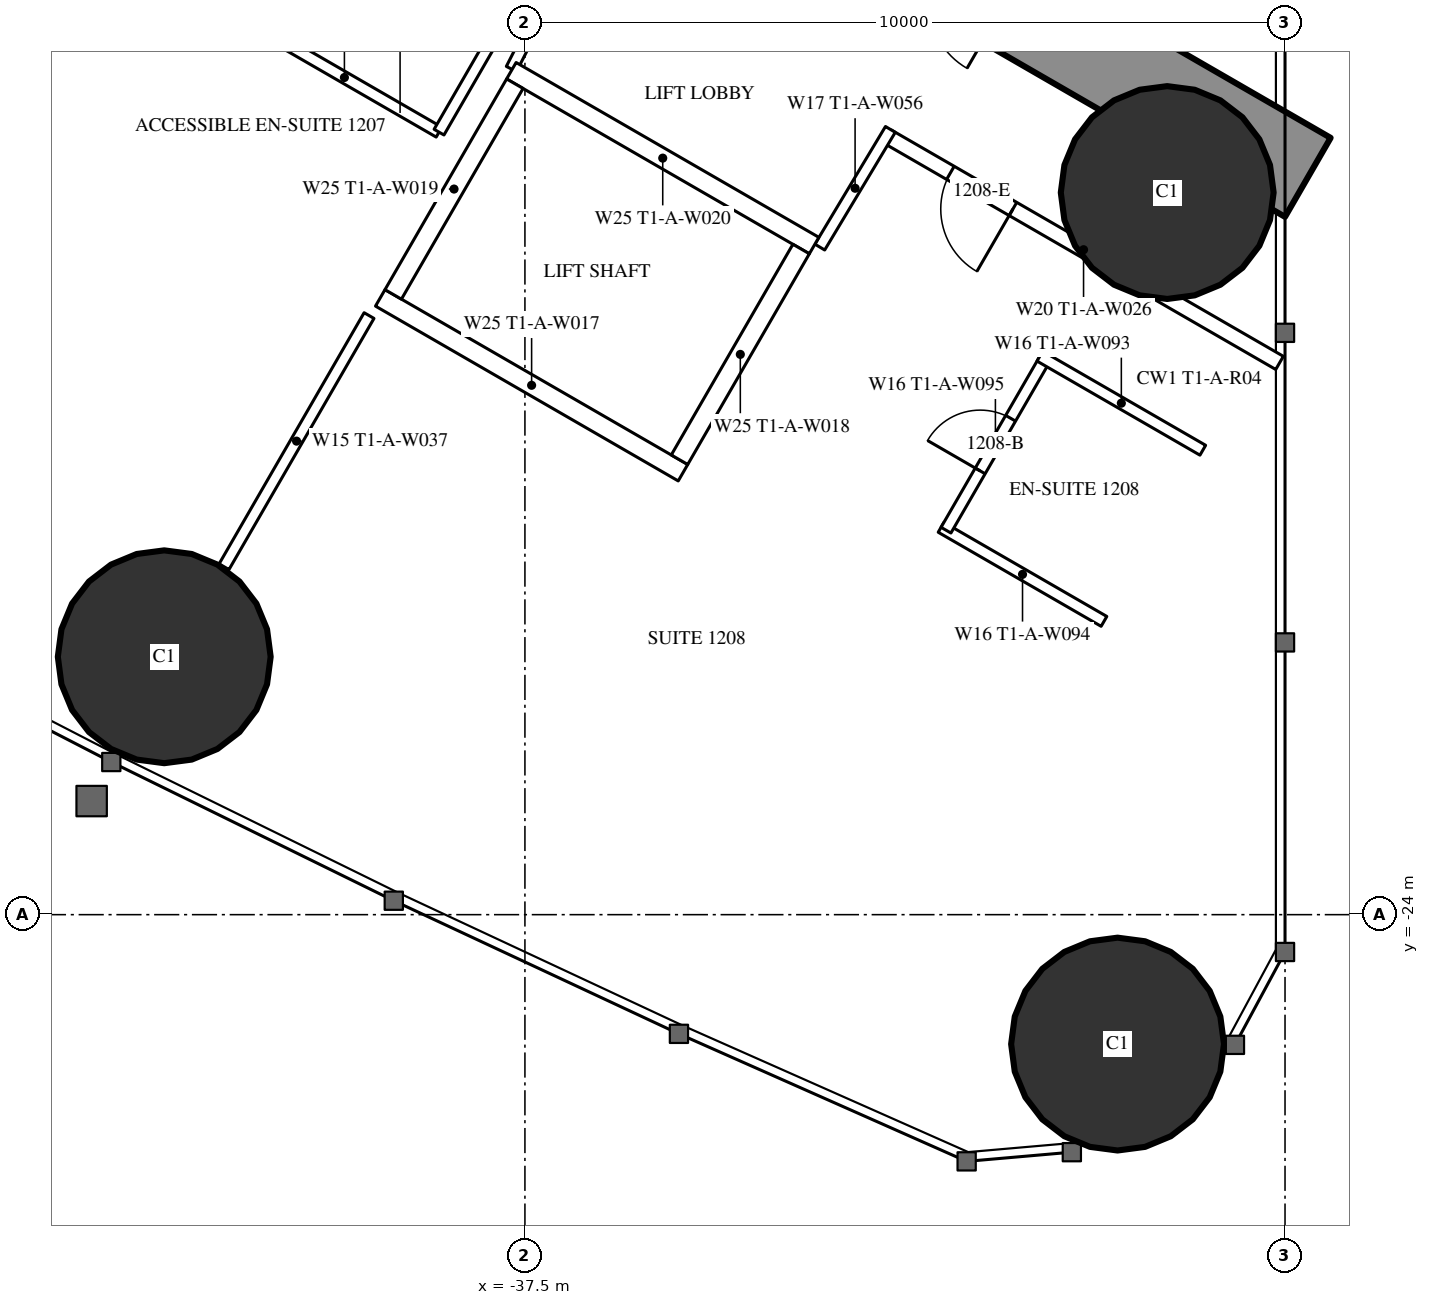
"""IFC4 building model, lengths in metres.
Left out: names, types, materials, properties, quantities, classifications, styles, units other than length and angle.
Written with IfcOpenShell. Run it as: python <this file> out.ifc"""

import sys

from ifc_helpers import new_model, si_unit, direction, frame, frame_2d, origin, origin_2d, place, context, subcontext, project, spatial, rectangle, hollow_circle, extrude, element, fill, save


model = new_model("IFC4")
c1 = context("Model", 3, precision=1e-05, world=origin(), true_north=direction((0.0, 1.0)))
c2 = subcontext(c1, "Body", "Model", "MODEL_VIEW")
j1 = project(units=[si_unit("LENGTHUNIT", "METRE"), si_unit("PLANEANGLEUNIT", "RADIAN")], contexts=[c1])
p1 = place(None, origin())
s1 = spatial("IfcSite", under=j1, at=p1, CompositionType="ELEMENT")
p2 = place(p1, origin())
s2 = spatial("IfcBuilding", under=s1, at=p2, CompositionType="ELEMENT")
p3 = place(p2, frame((0.0, 0.0, 49.5)))
s3 = spatial("IfcBuildingStorey", under=s2, at=p3, CompositionType="ELEMENT", Elevation=49.5)
for number, where, z_axis, x_axis in (
    (1, (-29.703, -25.703, 0.0), (0.0, 0.0, 1.0), (1.0, 0.0, 0.0)),
    (2, (-29.05, -14.5, 0.0), (0.0, 0.0, 1.0), (1.0, 0.0, 0.0)),
    (3, (-42.245, -20.607, 0.0), (0.0, 0.0, 1.0), (1.0, 0.0, 0.0)),
):
    element("IfcColumn", number, at=place(p3, frame(where, z_axis=z_axis, x_axis=x_axis)), inside=s3, PredefinedType="COLUMN", context=c2, shape_type="SweptSolid", body=[
        extrude(hollow_circle(Radius=1.4, WallThickness=0.12, at=origin_2d()), origin(), (0.0, 0.0, 1.0), 3.5),
    ])
p4 = place(p3, frame((-27.2, -14.3, 0.0), z_axis=(0.0, 0.0, 1.0), x_axis=(-0.866024021859, 0.500002393557, 0.0)))
e4 = element("IfcWall", 4, at=p4, inside=s3, PredefinedType="SHEAR", context=c2, shape_type="SweptSolid", body=[
    extrude(rectangle(XDim=27.907, YDim=1.2, at=frame_2d((13.954, 0.0))), origin(), (0.0, 0.0, 1.0), 3.5),
])
p5 = place(p4, frame((4.6, 0.0, 0.0)))
e5 = element("IfcOpeningElement", 5, at=p5, cuts=e4, PredefinedType="OPENING", context=c2, shape_type="SweptSolid", body=[
    extrude(rectangle(XDim=1.0, YDim=2.2, at=frame_2d((0.5, 1.1))), frame((0.0, 0.61, 0.0), z_axis=(0.0, -1.0, 0.0), x_axis=(1.0, 0.0, 0.0)), (0.0, 0.0, 1.0), 1.22),
])
p6 = place(p4, frame((13.395, 0.0, 0.0)))
e6 = element("IfcOpeningElement", 6, at=p6, cuts=e4, PredefinedType="OPENING", context=c2, shape_type="SweptSolid", body=[
    extrude(rectangle(XDim=1.8, YDim=2.2, at=frame_2d((0.9, 1.1))), frame((0.0, 0.61, 0.0), z_axis=(0.0, -1.0, 0.0), x_axis=(1.0, 0.0, 0.0)), (0.0, 0.0, 1.0), 1.22),
])
p7 = place(p3, frame((-39.551, -16.118, 0.0), z_axis=(0.0, 0.0, 1.0), x_axis=(-0.499986503906, -0.866033195618, 0.0)))
e7 = element("IfcWall", 7, at=p7, inside=s3, PredefinedType="PARTITIONING", context=c2, shape_type="SweptSolid", body=[
    extrude(rectangle(XDim=3.815, YDim=0.15, at=frame_2d((1.907, 0.0))), origin(), (0.0, 0.0, 1.0), 3.25),
])
p8 = place(p3, frame((-27.572, -16.741, 0.0), z_axis=(0.0, 0.0, 1.0), x_axis=(-0.866024464444, 0.500001626982, 0.0)))
e8 = element("IfcWall", 8, at=p8, inside=s3, PredefinedType="PARTITIONING", context=c2, shape_type="SweptSolid", body=[
    extrude(rectangle(XDim=5.955, YDim=0.2, at=frame_2d((2.978, 0.0))), origin(), (0.0, 0.0, 1.0), 3.25),
])
p9 = place(p8, frame((4.05, 0.0, 0.0)))
e9 = element("IfcOpeningElement", 9, at=p9, cuts=e8, PredefinedType="OPENING", context=c2, shape_type="SweptSolid", body=[
    extrude(rectangle(XDim=0.95, YDim=2.2, at=frame_2d((0.475, 1.1))), frame((0.0, 0.11, 0.0), z_axis=(0.0, -1.0, 0.0), x_axis=(1.0, 0.0, 0.0)), (0.0, 0.0, 1.0), 0.22),
])
p10 = place(p3, frame((-36.857, -11.265, 0.0), z_axis=(0.0, 0.0, 1.0), x_axis=(-0.454225294761, -0.890886851176, 0.0)))
e10 = element("IfcWall", 10, at=p10, inside=s3, PredefinedType="PARTITIONING", context=c2, shape_type="SweptSolid", body=[
    extrude(rectangle(XDim=1.807, YDim=0.15, at=frame_2d((0.904, 0.0))), origin(), (0.0, 0.0, 1.0), 3.25),
])
p11 = place(p3, frame((-33.621, -15.218, 0.0), z_axis=(0.0, 0.0, 1.0), x_axis=(0.514336634837, 0.857588377991, 0.0)))
e11 = element("IfcWall", 11, at=p11, inside=s3, PredefinedType="PARTITIONING", context=c2, shape_type="SweptSolid", body=[
    extrude(rectangle(XDim=1.805, YDim=0.15, at=frame_2d((0.903, 0.0))), origin(), (0.0, 0.0, 1.0), 3.25),
])
p12 = place(p3, frame((-38.63, -13.705, 0.0), z_axis=(0.0, 0.0, 1.0), x_axis=(-0.866018712932, 0.500011588718, 0.0)))
e12 = element("IfcWall", 12, at=p12, inside=s3, PredefinedType="PARTITIONING", context=c2, shape_type="SweptSolid", body=[
    extrude(rectangle(XDim=2.875, YDim=0.15, at=frame_2d((1.438, 0.0))), origin(), (0.0, 0.0, 1.0), 3.25),
])
p13 = place(p3, frame((-37.23, -11.281, 0.0), z_axis=(0.0, 0.0, 1.0), x_axis=(-0.500049511043, -0.865996816683, 0.0)))
e13 = element("IfcWall", 13, at=p13, inside=s3, PredefinedType="PARTITIONING", context=c2, shape_type="SweptSolid", body=[
    extrude(rectangle(XDim=2.8, YDim=0.15, at=frame_2d((1.4, 0.0))), origin(), (0.0, 0.0, 1.0), 3.25),
])
p14 = place(p3, frame((-29.882, -20.142, 0.0), z_axis=(0.0, 0.0, 1.0), x_axis=(-0.866031185235, 0.4999899861, 0.0)))
e14 = element("IfcWall", 14, at=p14, inside=s3, PredefinedType="PARTITIONING", context=c2, shape_type="SweptSolid", body=[
    extrude(rectangle(XDim=2.475, YDim=0.15, at=frame_2d((1.238, 0.0))), origin(), (0.0, 0.0, 1.0), 3.25),
])
p15 = place(p3, frame((-30.66, -16.69, 0.0), z_axis=(0.0, 0.0, 1.0), x_axis=(-0.499936506574, -0.866062058628, 0.0)))
e15 = element("IfcWall", 15, at=p15, inside=s3, PredefinedType="PARTITIONING", context=c2, shape_type="SweptSolid", body=[
    extrude(rectangle(XDim=2.6, YDim=0.15, at=frame_2d((1.3, 0.0))), origin(), (0.0, 0.0, 1.0), 3.25),
])
p16 = place(p15, frame((0.9, 0.0, 0.0)))
e16 = element("IfcOpeningElement", 16, at=p16, cuts=e15, PredefinedType="OPENING", context=c2, shape_type="SweptSolid", body=[
    extrude(rectangle(XDim=0.8, YDim=2.2, at=frame_2d((0.4, 1.1))), frame((0.0, 0.085, 0.0), z_axis=(0.0, -1.0, 0.0), x_axis=(1.0, 0.0, 0.0)), (0.0, 0.0, 1.0), 0.17),
])
p17 = place(p3, frame((-28.582, -17.89, 0.0), z_axis=(0.0, 0.0, 1.0), x_axis=(-0.866073894602, 0.499916002032, 0.0)))
e17 = element("IfcWall", 17, at=p17, inside=s3, PredefinedType="PARTITIONING", context=c2, shape_type="SweptSolid", body=[
    extrude(rectangle(XDim=2.475, YDim=0.15, at=frame_2d((1.238, 0.0))), origin(), (0.0, 0.0, 1.0), 3.25),
])
p18 = place(p3, frame((-33.696, -15.197, 0.0), z_axis=(0.0, 0.0, 1.0), x_axis=(-0.865976953817, 0.500083908417, 0.0)))
e18 = element("IfcWall", 18, at=p18, inside=s3, PredefinedType="PARTITIONING", context=c2, shape_type="SweptSolid", body=[
    extrude(rectangle(XDim=4.599, YDim=0.25, at=frame_2d((2.3, 0.0))), origin(), (0.0, 0.0, 1.0), 3.25),
])
p19 = place(p3, frame((-35.42, -18.186, 0.0), z_axis=(0.0, 0.0, 1.0), x_axis=(-0.865990227814, 0.50006092162, 0.0)))
e19 = element("IfcWall", 19, at=p19, inside=s3, PredefinedType="PARTITIONING", context=c2, shape_type="SweptSolid", body=[
    extrude(rectangle(XDim=4.6, YDim=0.25, at=frame_2d((2.3, 0.0))), origin(), (0.0, 0.0, 1.0), 3.25),
])
p20 = place(p3, frame((-33.866, -15.243, 0.0), z_axis=(0.0, 0.0, 1.0), x_axis=(-0.499929347863, -0.866066190972, 0.0)))
e20 = element("IfcWall", 20, at=p20, inside=s3, PredefinedType="PARTITIONING", context=c2, shape_type="SweptSolid", body=[
    extrude(rectangle(XDim=3.201, YDim=0.25, at=frame_2d((1.6, 0.0))), origin(), (0.0, 0.0, 1.0), 3.25),
])
p21 = place(p3, frame((-37.633, -13.068, 0.0), z_axis=(0.0, 0.0, 1.0), x_axis=(-0.499872130319, -0.866099216793, 0.0)))
e21 = element("IfcWall", 21, at=p21, inside=s3, PredefinedType="PARTITIONING", context=c2, shape_type="SweptSolid", body=[
    extrude(rectangle(XDim=3.2, YDim=0.25, at=frame_2d((1.6, 0.0))), origin(), (0.0, 0.0, 1.0), 3.25),
])
p22 = place(p16, origin())
e22 = element("IfcDoor", 22, at=p22, inside=s3, OperationType="SINGLE_SWING_RIGHT", PredefinedType="DOOR", context=c2, shape_type="SweptSolid", body=[
    extrude(rectangle(XDim=0.8, YDim=2.2, at=frame_2d((0.4, 1.1))), frame((0.0, 0.025, 0.0), z_axis=(0.0, -1.0, 0.0), x_axis=(1.0, 0.0, 0.0)), (0.0, 0.0, 1.0), 0.05),
])
fill(e16, e22)
p23 = place(p9, origin())
e23 = element("IfcDoor", 23, at=p23, inside=s3, OperationType="SINGLE_SWING_LEFT", PredefinedType="DOOR", context=c2, shape_type="SweptSolid", body=[
    extrude(rectangle(XDim=0.95, YDim=2.2, at=frame_2d((0.475, 1.1))), frame((0.0, 0.025, 0.0), z_axis=(0.0, -1.0, 0.0), x_axis=(1.0, 0.0, 0.0)), (0.0, 0.0, 1.0), 0.05),
])
fill(e9, e23)
save(model, sys.argv[1])
